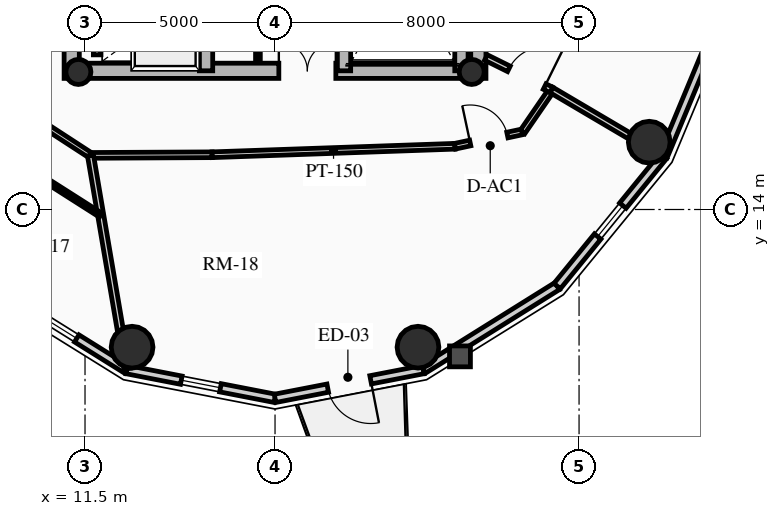
"""IFC4 building model, lengths in metres.
Left out: names, types, materials, properties, quantities, classifications, styles, units other than length and angle.
Written with IfcOpenShell. Run it as: python <this file> out.ifc"""

import sys

from ifc_helpers import new_model, si_unit, direction, frame, frame_2d, origin, origin_2d, place, context, subcontext, project, spatial, rectangle, circle, hollow_circle, extrude, source, transform, mapped, element, fill, save


model = new_model("IFC4")
c1 = context("Model", 3, precision=1e-05, world=origin(), true_north=direction((0.0, 1.0)))
c2 = subcontext(c1, "Body", "Model", "MODEL_VIEW")
j1 = project(units=[si_unit("LENGTHUNIT", "METRE"), si_unit("PLANEANGLEUNIT", "RADIAN")], contexts=[c1])
p1 = place(None, origin())
s1 = spatial("IfcSite", under=j1, at=p1, CompositionType="ELEMENT")
p2 = place(p1, origin())
s2 = spatial("IfcBuilding", under=s1, at=p2, CompositionType="ELEMENT")
p3 = place(p2, frame((0.0, 0.0, 222.85)))
s3 = spatial("IfcBuildingStorey", under=s2, at=p3, CompositionType="ELEMENT", Elevation=222.85)
for number, where, z_axis, x_axis in (
    (1, (11.15, 17.45, 0.0), (0.0, 0.0, 1.0), (0.0, 1.0, 0.0)),
    (2, (21.85, 17.45, 0.0), (0.0, 0.0, 1.0), (0.0, 1.0, 0.0)),
):
    element("IfcWall", number, at=place(p3, frame(where, z_axis=z_axis, x_axis=x_axis)), inside=s3, PredefinedType="SHEAR", context=c2, shape_type="SweptSolid", body=[
        extrude(rectangle(XDim=14.1, YDim=0.4, at=frame_2d((7.05, 0.0))), origin(), (0.0, 0.0, 1.0), 3.2),
    ])
p4 = place(p3, frame((11.15, 17.65, 0.0), z_axis=(0.0, 0.0, 1.0), x_axis=(1.0, 0.0, 0.0)))
e3 = element("IfcWall", 3, at=p4, inside=s3, PredefinedType="SHEAR", context=c2, shape_type="SweptSolid", body=[
    extrude(rectangle(XDim=10.7, YDim=0.4, at=frame_2d((5.35, 0.0))), origin(), (0.0, 0.0, 1.0), 3.2),
])
m1 = source(origin(), c2, "Body", "SweptSolid", [
    extrude(rectangle(XDim=1.5, YDim=2.02, at=frame_2d((0.75, 1.01))), frame((0.0, 0.21, 0.0), z_axis=(0.0, -1.0, 0.0), x_axis=(1.0, 0.0, 0.0)), (0.0, 0.0, 1.0), 0.42),
])
p5 = place(p4, frame((5.45, 0.0, 0.0)))
e4 = element("IfcOpeningElement", 4, at=p5, cuts=e3, PredefinedType="OPENING", context=c2, shape_type="MappedRepresentation", body=[
    mapped(m1, transform((0.0, 0.0, 0.0), x_axis=(1.0, 0.0, 0.0), y_axis=(0.0, 1.0, 0.0), z_axis=(0.0, 0.0, 1.0), scale=1.0)),
])
p6 = place(p3, frame((14.685, 17.65, 0.0), z_axis=(0.0, 0.0, 1.0), x_axis=(0.0, 1.0, 0.0)))
e5 = element("IfcWall", 5, at=p6, inside=s3, PredefinedType="SHEAR", context=c2, shape_type="SweptSolid", body=[
    extrude(rectangle(XDim=13.7, YDim=0.35, at=frame_2d((6.85, 0.0))), origin(), (0.0, 0.0, 1.0), 3.2),
])
m2 = source(origin(), c2, "Body", "SweptSolid", [
    extrude(rectangle(XDim=1.1, YDim=2.015, at=frame_2d((0.55, 1.007))), frame((0.0, 0.185, 0.0), z_axis=(0.0, -1.0, 0.0), x_axis=(1.0, 0.0, 0.0)), (0.0, 0.0, 1.0), 0.37),
])
p7 = place(p6, frame((4.85, 0.0, 0.0)))
e6 = element("IfcOpeningElement", 6, at=p7, cuts=e5, PredefinedType="OPENING", context=c2, shape_type="MappedRepresentation", body=[
    mapped(m2, transform((0.0, 0.0, 0.0), x_axis=(1.0, 0.0, 0.0), y_axis=(0.0, 1.0, 0.0), z_axis=(0.0, 0.0, 1.0), scale=1.0)),
])
p8 = place(p6, frame((0.625, 0.0, 0.0)))
e7 = element("IfcOpeningElement", 7, at=p8, cuts=e5, PredefinedType="OPENING", context=c2, shape_type="MappedRepresentation", body=[
    mapped(m2, transform((0.0, 0.0, 0.0), x_axis=(1.0, 0.0, 0.0), y_axis=(0.0, 1.0, 0.0), z_axis=(0.0, 0.0, 1.0), scale=1.0)),
])
p9 = place(p6, frame((2.625, 0.0, 0.0)))
e8 = element("IfcOpeningElement", 8, at=p9, cuts=e5, PredefinedType="OPENING", context=c2, shape_type="MappedRepresentation", body=[
    mapped(m2, transform((0.0, 0.0, 0.0), x_axis=(1.0, 0.0, 0.0), y_axis=(0.0, 1.0, 0.0), z_axis=(0.0, 0.0, 1.0), scale=1.0)),
])
m3 = source(origin(), c2, "Body", "SweptSolid", [
    extrude(rectangle(XDim=1.15, YDim=2.02, at=frame_2d((0.575, 1.01))), frame((0.0, 0.185, 0.0), z_axis=(0.0, -1.0, 0.0), x_axis=(1.0, 0.0, 0.0)), (0.0, 0.0, 1.0), 0.37),
])
p10 = place(p6, frame((7.27, 0.0, 0.0)))
e9 = element("IfcOpeningElement", 9, at=p10, cuts=e5, PredefinedType="OPENING", context=c2, shape_type="MappedRepresentation", body=[
    mapped(m3, transform((0.0, 0.0, 0.0), x_axis=(1.0, 0.0, 0.0), y_axis=(0.0, 1.0, 0.0), z_axis=(0.0, 0.0, 1.0), scale=1.0)),
])
p11 = place(p3, frame((18.315, 17.65, 0.0), z_axis=(0.0, 0.0, 1.0), x_axis=(0.0, 1.0, 0.0)))
e10 = element("IfcWall", 10, at=p11, inside=s3, PredefinedType="SHEAR", context=c2, shape_type="SweptSolid", body=[
    extrude(rectangle(XDim=9.6, YDim=0.35, at=frame_2d((4.8, 0.0))), origin(), (0.0, 0.0, 1.0), 3.2),
])
p12 = place(p11, frame((5.28, 0.0, 0.0)))
e11 = element("IfcOpeningElement", 11, at=p12, cuts=e10, PredefinedType="OPENING", context=c2, shape_type="MappedRepresentation", body=[
    mapped(m3, transform((0.0, 0.0, 0.0), x_axis=(1.0, 0.0, 0.0), y_axis=(0.0, 1.0, 0.0), z_axis=(0.0, 0.0, 1.0), scale=1.0)),
])
p13 = place(p3, frame((21.405, 17.65, 0.0), z_axis=(0.0, 0.0, 1.0), x_axis=(0.0, 1.0, 0.0)))
e12 = element("IfcWall", 12, at=p13, inside=s3, PredefinedType="SHEAR", context=c2, shape_type="SweptSolid", body=[
    extrude(rectangle(XDim=6.695, YDim=0.35, at=frame_2d((3.348, 0.0))), origin(), (0.0, 0.0, 1.0), 3.2),
])
for number, where, z_axis, x_axis in (
    (13, (11.325, 17.62, 0.0), (0.0, 0.0, 1.0), (1.0, 0.0, 0.0)),
    (14, (21.675, 17.62, 0.0), (0.0, 0.0, 1.0), (1.0, 0.0, 0.0)),
):
    element("IfcColumn", number, at=place(p3, frame(where, z_axis=z_axis, x_axis=x_axis)), inside=s3, PredefinedType="COLUMN", context=c2, shape_type="SweptSolid", body=[
        extrude(hollow_circle(Radius=0.33, WallThickness=0.025, at=origin_2d()), origin(), (0.0, 0.0, 1.0), 3.2),
    ])
for number, where, z_axis, x_axis in (
    (15, (12.739, 10.377, 0.0), (0.0, 0.0, 1.0), (1.0, 0.0, 0.0)),
    (16, (20.261, 10.377, 0.0), (0.0, 0.0, 1.0), (1.0, 0.0, 0.0)),
    (17, (26.347, 15.771, 0.0), (0.0, 0.0, 1.0), (1.0, 0.0, 0.0)),
):
    element("IfcColumn", number, at=place(p3, frame(where, z_axis=z_axis, x_axis=x_axis)), inside=s3, PredefinedType="USERDEFINED", context=c2, shape_type="SweptSolid", body=[
        extrude(circle(Radius=0.55, at=origin_2d()), origin(), (0.0, 0.0, 1.0), 3.2),
    ])
p14 = place(p3, frame((12.597, 9.787, 0.0), z_axis=(0.0, 0.0, 1.0), x_axis=(-0.848318713376, 0.529485939886, 0.0)))
e18 = element("IfcWall", 18, at=p14, inside=s3, PredefinedType="SOLIDWALL", context=c2, shape_type="SweptSolid", body=[
    extrude(rectangle(XDim=4.15, YDim=0.22, at=frame_2d((2.075, 0.0))), origin(), (0.0, 0.0, 1.0), 2.612),
])
m4 = source(origin(), c2, "Body", "SweptSolid", [
    extrude(rectangle(XDim=1.05, YDim=1.3, at=frame_2d((0.525, 0.65))), frame((0.0, 0.12, 0.0), z_axis=(0.0, -1.0, 0.0), x_axis=(1.0, 0.0, 0.0)), (0.0, 0.0, 1.0), 0.24),
])
p15 = place(p14, frame((1.55, 0.0, 0.65)))
e19 = element("IfcOpeningElement", 19, at=p15, cuts=e18, PredefinedType="OPENING", context=c2, shape_type="MappedRepresentation", body=[
    mapped(m4, transform((0.0, 0.0, 0.0), x_axis=(1.0, 0.0, 0.0), y_axis=(0.0, 1.0, 0.0), z_axis=(0.0, 0.0, 1.0), scale=1.0)),
])
p16 = place(p3, frame((16.5, 9.03, 0.0), z_axis=(0.0, 0.0, 1.0), x_axis=(-0.981700307484, 0.190432419211, 0.0)))
e20 = element("IfcWall", 20, at=p16, inside=s3, PredefinedType="SOLIDWALL", context=c2, shape_type="SweptSolid", body=[
    extrude(rectangle(XDim=3.976, YDim=0.22, at=frame_2d((1.988, 0.0))), origin(), (0.0, 0.0, 1.0), 2.612),
])
p17 = place(p16, frame((1.463, 0.0, 0.65)))
e21 = element("IfcOpeningElement", 21, at=p17, cuts=e20, PredefinedType="OPENING", context=c2, shape_type="MappedRepresentation", body=[
    mapped(m4, transform((0.0, 0.0, 0.0), x_axis=(1.0, 0.0, 0.0), y_axis=(0.0, 1.0, 0.0), z_axis=(0.0, 0.0, 1.0), scale=1.0)),
])
p18 = place(p3, frame((20.403, 9.787, 0.0), z_axis=(0.0, 0.0, 1.0), x_axis=(-0.981700307484, -0.190432419211, 0.0)))
e22 = element("IfcWall", 22, at=p18, inside=s3, PredefinedType="SOLIDWALL", context=c2, shape_type="SweptSolid", body=[
    extrude(rectangle(XDim=3.976, YDim=0.22, at=frame_2d((1.988, 0.0))), origin(), (0.0, 0.0, 1.0), 2.612),
])
m5 = source(origin(), c2, "Body", "SweptSolid", [
    extrude(rectangle(XDim=1.15, YDim=2.005, at=frame_2d((0.575, 1.002))), frame((0.0, 0.12, 0.0), z_axis=(0.0, -1.0, 0.0), x_axis=(1.0, 0.0, 0.0)), (0.0, 0.0, 1.0), 0.24),
])
p19 = place(p18, frame((1.413, 0.0, 0.0)))
e23 = element("IfcOpeningElement", 23, at=p19, cuts=e22, PredefinedType="OPENING", context=c2, shape_type="MappedRepresentation", body=[
    mapped(m5, transform((0.0, 0.0, 0.0), x_axis=(1.0, 0.0, 0.0), y_axis=(0.0, 1.0, 0.0), z_axis=(0.0, 0.0, 1.0), scale=1.0)),
])
p20 = place(p3, frame((23.924, 11.985, 0.0), z_axis=(0.0, 0.0, 1.0), x_axis=(-0.848318713376, -0.529485939886, 0.0)))
e24 = element("IfcWall", 24, at=p20, inside=s3, PredefinedType="SOLIDWALL", context=c2, shape_type="SweptSolid", body=[
    extrude(rectangle(XDim=4.15, YDim=0.22, at=frame_2d((2.075, 0.0))), origin(), (0.0, 0.0, 1.0), 2.612),
])
p21 = place(p3, frame((26.718, 15.407, 0.0), z_axis=(0.0, 0.0, 1.0), x_axis=(-0.632467166636, -0.774587169483, 0.0)))
e25 = element("IfcWall", 25, at=p21, inside=s3, PredefinedType="SOLIDWALL", context=c2, shape_type="SweptSolid", body=[
    extrude(rectangle(XDim=4.418, YDim=0.22, at=frame_2d((2.209, 0.0))), origin(), (0.0, 0.0, 1.0), 2.612),
])
p22 = place(p21, frame((1.684, 0.0, 0.65)))
e26 = element("IfcOpeningElement", 26, at=p22, cuts=e25, PredefinedType="OPENING", context=c2, shape_type="MappedRepresentation", body=[
    mapped(m4, transform((0.0, 0.0, 0.0), x_axis=(1.0, 0.0, 0.0), y_axis=(0.0, 1.0, 0.0), z_axis=(0.0, 0.0, 1.0), scale=1.0)),
])
p23 = place(p3, frame((28.512, 19.719, 0.0), z_axis=(0.0, 0.0, 1.0), x_axis=(-0.384036305194, -0.923317993052, 0.0)))
e27 = element("IfcWall", 27, at=p23, inside=s3, PredefinedType="SOLIDWALL", context=c2, shape_type="SweptSolid", body=[
    extrude(rectangle(XDim=4.671, YDim=0.22, at=frame_2d((2.335, 0.0))), origin(), (0.0, 0.0, 1.0), 2.612),
])
p24 = place(p3, frame((11.82, 18.07, 0.0), z_axis=(0.0, 0.0, 1.0), x_axis=(0.0, 1.0, 0.0)))
e28 = element("IfcWall", 28, at=p24, inside=s3, PredefinedType="SHEAR", context=c2, shape_type="SweptSolid", body=[
    extrude(rectangle(XDim=1.635, YDim=0.2, at=frame_2d((0.817, 0.0))), origin(), (0.0, 0.0, 1.0), 3.2),
])
p25 = place(p3, frame((16.05, 17.92, 0.0), z_axis=(0.0, 0.0, 1.0), x_axis=(0.0, 1.0, 0.0)))
e29 = element("IfcWall", 29, at=p25, inside=s3, PredefinedType="PARTITIONING", context=c2, shape_type="SweptSolid", body=[
    extrude(rectangle(XDim=3.08, YDim=0.125, at=frame_2d((1.54, 0.0))), origin(), (0.0, 0.0, 1.0), 2.975),
])
m6 = source(origin(), c2, "Body", "SweptSolid", [
    extrude(rectangle(XDim=0.9, YDim=2.005, at=frame_2d((0.45, 1.002))), frame((0.0, 0.073, 0.0), z_axis=(0.0, -1.0, 0.0), x_axis=(1.0, 0.0, 0.0)), (0.0, 0.0, 1.0), 0.145),
])
p26 = place(p25, frame((1.05, 0.0, 0.0)))
e30 = element("IfcOpeningElement", 30, at=p26, cuts=e29, PredefinedType="OPENING", context=c2, shape_type="MappedRepresentation", body=[
    mapped(m6, transform((0.0, 0.0, 0.0), x_axis=(1.0, 0.0, 0.0), y_axis=(0.0, 1.0, 0.0), z_axis=(0.0, 0.0, 1.0), scale=1.0)),
])
p27 = place(p3, frame((10.358, 16.26, 0.0), z_axis=(0.0, 0.0, 1.0), x_axis=(0.838265397059, -0.545262435983, 0.0)))
e31 = element("IfcWall", 31, at=p27, inside=s3, PredefinedType="PARTITIONING", context=c2, shape_type="SweptSolid", body=[
    extrude(rectangle(XDim=1.534, YDim=0.15, at=frame_2d((0.767, 0.0))), origin(), (0.0, 0.0, 1.0), 2.545),
])
p28 = place(p3, frame((11.644, 15.424, 0.0), z_axis=(0.0, 0.0, 1.0), x_axis=(0.999986552511, 0.005186019339, 0.0)))
e32 = element("IfcWall", 32, at=p28, inside=s3, PredefinedType="PARTITIONING", context=c2, shape_type="SweptSolid", body=[
    extrude(rectangle(XDim=3.201, YDim=0.15, at=frame_2d((1.601, 0.0))), origin(), (0.0, 0.0, 1.0), 2.612),
])
p29 = place(p3, frame((14.845, 15.441, 0.0), z_axis=(0.0, 0.0, 1.0), x_axis=(0.99938794868, 0.034981824334, 0.0)))
e33 = element("IfcWall", 33, at=p29, inside=s3, PredefinedType="PARTITIONING", context=c2, shape_type="SweptSolid", body=[
    extrude(rectangle(XDim=6.393, YDim=0.15, at=frame_2d((3.196, 0.0))), origin(), (0.0, 0.0, 1.0), 2.545),
])
p30 = place(p3, frame((21.234, 15.664, 0.0), z_axis=(0.0, 0.0, 1.0), x_axis=(0.977931581182, 0.208925399431, 0.0)))
e34 = element("IfcWall", 34, at=p30, inside=s3, PredefinedType="PARTITIONING", context=c2, shape_type="SweptSolid", body=[
    extrude(rectangle(XDim=1.823, YDim=0.15, at=frame_2d((0.912, 0.0))), origin(), (0.0, 0.0, 1.0), 2.545),
])
m7 = source(origin(), c2, "Body", "SweptSolid", [
    extrude(rectangle(XDim=1.0, YDim=2.015, at=frame_2d((0.5, 1.007))), frame((0.0, 0.085, 0.0), z_axis=(0.0, -1.0, 0.0), x_axis=(1.0, 0.0, 0.0)), (0.0, 0.0, 1.0), 0.17),
])
p31 = place(p30, frame((0.412, 0.0, 0.0)))
e35 = element("IfcOpeningElement", 35, at=p31, cuts=e34, PredefinedType="OPENING", context=c2, shape_type="MappedRepresentation", body=[
    mapped(m7, transform((0.0, 0.0, 0.0), x_axis=(1.0, 0.0, 0.0), y_axis=(0.0, 1.0, 0.0), z_axis=(0.0, 0.0, 1.0), scale=1.0)),
])
p32 = place(p3, frame((23.017, 16.045, 0.0), z_axis=(0.0, 0.0, 1.0), x_axis=(0.566660656138, 0.823951273308, 0.0)))
e36 = element("IfcWall", 36, at=p32, inside=s3, PredefinedType="PARTITIONING", context=c2, shape_type="SweptSolid", body=[
    extrude(rectangle(XDim=1.336, YDim=0.15, at=frame_2d((0.668, 0.0))), origin(), (0.0, 0.0, 1.0), 2.612),
])
p33 = place(p3, frame((11.644, 15.424, 0.0), z_axis=(0.0, 0.0, 1.0), x_axis=(0.168350269159, -0.985727237563, 0.0)))
e37 = element("IfcWall", 37, at=p33, inside=s3, PredefinedType="PARTITIONING", context=c2, shape_type="SweptSolid", body=[
    extrude(rectangle(XDim=5.699, YDim=0.16, at=frame_2d((2.85, 0.0))), origin(), (0.0, 0.0, 1.0), 2.612),
])
p34 = place(p3, frame((23.774, 17.146, 0.0), z_axis=(0.0, 0.0, 1.0), x_axis=(0.861296601099, -0.508102514198, 0.0)))
e38 = element("IfcWall", 38, at=p34, inside=s3, PredefinedType="PARTITIONING", context=c2, shape_type="SweptSolid", body=[
    extrude(rectangle(XDim=3.399, YDim=0.16, at=frame_2d((1.7, 0.0))), origin(), (0.0, 0.0, 1.0), 2.612),
])
p35 = place(p3, frame((22.05, 18.0, 0.0), z_axis=(0.0, 0.0, 1.0), x_axis=(0.896045848613, -0.443961526692, 0.0)))
e39 = element("IfcWall", 39, at=p35, inside=s3, PredefinedType="PARTITIONING", context=c2, shape_type="SweptSolid", body=[
    extrude(rectangle(XDim=1.924, YDim=0.16, at=frame_2d((0.962, 0.0))), origin(), (0.0, 0.0, 1.0), 2.545),
])
m8 = source(origin(), c2, "Body", "SweptSolid", [
    extrude(rectangle(XDim=1.05, YDim=2.015, at=frame_2d((0.525, 1.007))), frame((0.0, 0.09, 0.0), z_axis=(0.0, -1.0, 0.0), x_axis=(1.0, 0.0, 0.0)), (0.0, 0.0, 1.0), 0.18),
])
p36 = place(p35, frame((0.674, 0.0, 0.0)))
e40 = element("IfcOpeningElement", 40, at=p36, cuts=e39, PredefinedType="OPENING", context=c2, shape_type="MappedRepresentation", body=[
    mapped(m8, transform((0.0, 0.0, 0.0), x_axis=(1.0, 0.0, 0.0), y_axis=(0.0, 1.0, 0.0), z_axis=(0.0, 0.0, 1.0), scale=1.0)),
])
p37 = place(p3, frame((10.002, 15.068, 0.0), z_axis=(0.0, 0.0, 1.0), x_axis=(0.843381706724, -0.537314895349, 0.0)))
e41 = element("IfcWall", 41, at=p37, inside=s3, PredefinedType="PARTITIONING", context=c2, shape_type="SweptSolid", body=[
    extrude(rectangle(XDim=2.265, YDim=0.125, at=frame_2d((1.132, 0.0))), origin(), (0.0, 0.0, 1.0), 2.545),
])
m9 = source(origin(), c2, "Body", "SweptSolid", [
    extrude(rectangle(XDim=1.05, YDim=1.3, at=frame_2d((0.525, 0.65))), frame((0.0, 0.03, 0.0), z_axis=(0.0, -1.0, 0.0), x_axis=(1.0, 0.0, 0.0)), (0.0, 0.0, 1.0), 0.06),
])
p38 = place(p15, origin())
e42 = element("IfcWindow", 42, at=p38, inside=s3, PartitioningType="SINGLE_PANEL", PredefinedType="WINDOW", context=c2, shape_type="MappedRepresentation", body=[
    mapped(m9, transform((0.0, 0.0, 0.0), x_axis=(1.0, 0.0, 0.0), y_axis=(0.0, 1.0, 0.0), z_axis=(0.0, 0.0, 1.0), scale=1.0)),
])
fill(e19, e42)
p39 = place(p17, origin())
e43 = element("IfcWindow", 43, at=p39, inside=s3, PartitioningType="SINGLE_PANEL", PredefinedType="WINDOW", context=c2, shape_type="MappedRepresentation", body=[
    mapped(m9, transform((0.0, 0.0, 0.0), x_axis=(1.0, 0.0, 0.0), y_axis=(0.0, 1.0, 0.0), z_axis=(0.0, 0.0, 1.0), scale=1.0)),
])
fill(e21, e43)
m10 = source(origin(), c2, "Body", "SweptSolid", [
    extrude(rectangle(XDim=1.15, YDim=2.005, at=frame_2d((0.575, 1.002))), frame((0.0, 0.025, 0.0), z_axis=(0.0, -1.0, 0.0), x_axis=(1.0, 0.0, 0.0)), (0.0, 0.0, 1.0), 0.05),
])
p40 = place(p19, origin())
e44 = element("IfcDoor", 44, at=p40, inside=s3, OperationType="SINGLE_SWING_LEFT", PredefinedType="DOOR", context=c2, shape_type="MappedRepresentation", body=[
    mapped(m10, transform((0.0, 0.0, 0.0), x_axis=(1.0, 0.0, 0.0), y_axis=(0.0, 1.0, 0.0), z_axis=(0.0, 0.0, 1.0), scale=1.0)),
])
fill(e23, e44)
p41 = place(p22, origin())
e45 = element("IfcWindow", 45, at=p41, inside=s3, PartitioningType="SINGLE_PANEL", PredefinedType="WINDOW", context=c2, shape_type="MappedRepresentation", body=[
    mapped(m9, transform((0.0, 0.0, 0.0), x_axis=(1.0, 0.0, 0.0), y_axis=(0.0, 1.0, 0.0), z_axis=(0.0, 0.0, 1.0), scale=1.0)),
])
fill(e26, e45)
m11 = source(origin(), c2, "Body", "SweptSolid", [
    extrude(rectangle(XDim=1.5, YDim=2.02, at=frame_2d((0.75, 1.01))), frame((0.0, 0.025, 0.0), z_axis=(0.0, -1.0, 0.0), x_axis=(1.0, 0.0, 0.0)), (0.0, 0.0, 1.0), 0.05),
])
p42 = place(p5, origin())
e46 = element("IfcDoor", 46, at=p42, inside=s3, OperationType="DOUBLE_DOOR_SINGLE_SWING", PredefinedType="DOOR", context=c2, shape_type="MappedRepresentation", body=[
    mapped(m11, transform((0.0, 0.0, 0.0), x_axis=(1.0, 0.0, 0.0), y_axis=(0.0, 1.0, 0.0), z_axis=(0.0, 0.0, 1.0), scale=1.0)),
])
fill(e4, e46)
m12 = source(origin(), c2, "Body", "SweptSolid", [
    extrude(rectangle(XDim=1.05, YDim=2.015, at=frame_2d((0.525, 1.007))), frame((0.0, 0.025, 0.0), z_axis=(0.0, -1.0, 0.0), x_axis=(1.0, 0.0, 0.0)), (0.0, 0.0, 1.0), 0.05),
])
p43 = place(p36, origin())
e47 = element("IfcDoor", 47, at=p43, inside=s3, OperationType="SINGLE_SWING_RIGHT", PredefinedType="DOOR", context=c2, shape_type="MappedRepresentation", body=[
    mapped(m12, transform((0.0, 0.0, 0.0), x_axis=(1.0, 0.0, 0.0), y_axis=(0.0, 1.0, 0.0), z_axis=(0.0, 0.0, 1.0), scale=1.0)),
])
fill(e40, e47)
m13 = source(origin(), c2, "Body", "SweptSolid", [
    extrude(rectangle(XDim=1.0, YDim=2.015, at=frame_2d((0.5, 1.007))), frame((0.0, 0.025, 0.0), z_axis=(0.0, -1.0, 0.0), x_axis=(1.0, 0.0, 0.0)), (0.0, 0.0, 1.0), 0.05),
])
p44 = place(p31, origin())
e48 = element("IfcDoor", 48, at=p44, inside=s3, OperationType="SINGLE_SWING_LEFT", PredefinedType="DOOR", context=c2, shape_type="MappedRepresentation", body=[
    mapped(m13, transform((0.0, 0.0, 0.0), x_axis=(1.0, 0.0, 0.0), y_axis=(0.0, 1.0, 0.0), z_axis=(0.0, 0.0, 1.0), scale=1.0)),
])
fill(e35, e48)
save(model, sys.argv[1])
